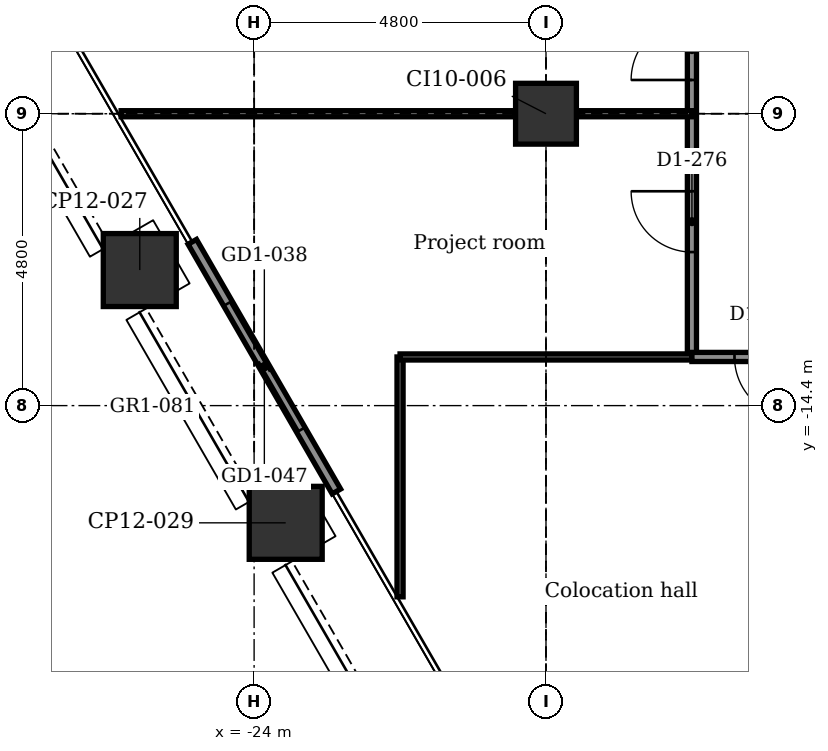
"""IFC4 building model, lengths in metres.
Left out: names, types, materials, properties, quantities, classifications, styles, units other than length and angle.
Written with IfcOpenShell. Run it as: python <this file> out.ifc"""

import sys

from ifc_helpers import new_model, si_unit, direction, frame, frame_2d, origin, origin_2d, place, context, subcontext, project, spatial, rectangle, extrude, element, fill, save


model = new_model("IFC4")
c1 = context("Model", 3, precision=1e-05, world=origin(), true_north=direction((0.0, 1.0)))
c2 = subcontext(c1, "Body", "Model", "MODEL_VIEW")
j1 = project(units=[si_unit("LENGTHUNIT", "METRE"), si_unit("PLANEANGLEUNIT", "RADIAN")], contexts=[c1])
p1 = place(None, origin())
s1 = spatial("IfcSite", under=j1, at=p1, CompositionType="ELEMENT")
p2 = place(p1, origin())
s2 = spatial("IfcBuilding", under=s1, at=p2, CompositionType="ELEMENT")
p3 = place(p2, frame((0.0, 0.0, 95.9)))
s3 = spatial("IfcBuildingStorey", under=s2, at=p3, CompositionType="ELEMENT", Elevation=95.9)
for number, where, z_axis, x_axis in (
    (1, (-23.48, -16.328, -0.2), (0.0, 0.0, 1.0), (0.866, 0.5, 0.0)),
    (2, (-25.88, -12.171, -0.2), (0.0, 0.0, 1.0), (0.866, 0.5, 0.0)),
):
    element("IfcColumn", number, at=place(p3, frame(where, z_axis=z_axis, x_axis=x_axis)), inside=s3, PredefinedType="COLUMN", context=c2, shape_type="SweptSolid", body=[
        extrude(rectangle(XDim=1.2, YDim=1.2, at=origin_2d()), origin(), (0.0, 0.0, 1.0), 4.5),
    ])
p4 = place(p3, frame((-19.2, -9.6, -0.2), z_axis=(0.0, 0.0, 1.0), x_axis=(1.0, 0.0, 0.0)))
e3 = element("IfcColumn", 3, at=p4, inside=s3, PredefinedType="COLUMN", context=c2, shape_type="SweptSolid", body=[
    extrude(rectangle(XDim=1.0, YDim=1.0, at=origin_2d()), origin(), (0.0, 0.0, 1.0), 4.5),
])
p5 = place(p3, frame((-22.647, -15.812, 0.0), z_axis=(0.0, 0.0, 1.0), x_axis=(-0.499978080042, 0.866038058908, 0.0)))
e4 = element("IfcWall", 4, at=p5, inside=s3, PredefinedType="PARTITIONING", context=c2, shape_type="SweptSolid", body=[
    extrude(rectangle(XDim=4.74, YDim=0.16, at=frame_2d((2.37, 0.0))), origin(), (0.0, 0.0, 1.0), 4.3),
])
p6 = place(p5, frame((1.17, 0.0, 0.0)))
e5 = element("IfcOpeningElement", 5, at=p6, cuts=e4, PredefinedType="OPENING", context=c2, shape_type="SweptSolid", body=[
    extrude(rectangle(XDim=2.4, YDim=2.4, at=frame_2d((1.2, 1.2))), frame((0.0, 0.09, 0.0), z_axis=(0.0, -1.0, 0.0), x_axis=(1.0, 0.0, 0.0)), (0.0, 0.0, 1.0), 0.18),
])
p7 = place(p3, frame((-16.8, -13.6, 0.0), z_axis=(0.0, 0.0, 1.0), x_axis=(0.0, 1.0, 0.0)))
e6 = element("IfcWall", 6, at=p7, inside=s3, PredefinedType="PARTITIONING", context=c2, shape_type="SweptSolid", body=[
    extrude(rectangle(XDim=9.65, YDim=0.15, at=frame_2d((4.825, 0.0))), origin(), (0.0, 0.0, 1.0), 4.3),
])
p8 = place(p7, frame((1.725, 0.0, 0.0)))
e7 = element("IfcOpeningElement", 7, at=p8, cuts=e6, PredefinedType="OPENING", context=c2, shape_type="SweptSolid", body=[
    extrude(rectangle(XDim=1.0, YDim=2.1, at=frame_2d((0.5, 1.05))), frame((0.0, 0.085, 0.0), z_axis=(0.0, -1.0, 0.0), x_axis=(1.0, 0.0, 0.0)), (0.0, 0.0, 1.0), 0.17),
])
p9 = place(p7, frame((4.555, 0.0, 0.0)))
e8 = element("IfcOpeningElement", 8, at=p9, cuts=e6, PredefinedType="OPENING", context=c2, shape_type="SweptSolid", body=[
    extrude(rectangle(XDim=1.0, YDim=2.1, at=frame_2d((0.5, 1.05))), frame((0.0, 0.085, 0.0), z_axis=(0.0, -1.0, 0.0), x_axis=(1.0, 0.0, 0.0)), (0.0, 0.0, 1.0), 0.17),
])
p10 = place(p7, frame((7.7, 0.0, 0.0)))
e9 = element("IfcOpeningElement", 9, at=p10, cuts=e6, PredefinedType="OPENING", context=c2, shape_type="SweptSolid", body=[
    extrude(rectangle(XDim=1.0, YDim=2.1, at=frame_2d((0.5, 1.05))), frame((0.0, 0.085, 0.0), z_axis=(0.0, -1.0, 0.0), x_axis=(1.0, 0.0, 0.0)), (0.0, 0.0, 1.0), 0.17),
])
p11 = place(p3, frame((-21.6, -17.545, 0.0), z_axis=(0.0, 0.0, 1.0), x_axis=(0.0, 1.0, 0.0)))
e10 = element("IfcWall", 10, at=p11, inside=s3, PredefinedType="PARTITIONING", context=c2, shape_type="SweptSolid", body=[
    extrude(rectangle(XDim=3.945, YDim=0.1, at=frame_2d((1.972, 0.0))), origin(), (0.0, 0.0, 1.0), 4.3),
])
p12 = place(p3, frame((-21.6, -13.6, 0.0), z_axis=(0.0, 0.0, 1.0), x_axis=(1.0, 0.0, 0.0)))
e11 = element("IfcWall", 11, at=p12, inside=s3, PredefinedType="PARTITIONING", context=c2, shape_type="SweptSolid", body=[
    extrude(rectangle(XDim=4.8, YDim=0.1, at=frame_2d((2.4, 0.0))), origin(), (0.0, 0.0, 1.0), 4.3),
])
p13 = place(p3, frame((-16.8, -13.6, 0.0), z_axis=(0.0, 0.0, 1.0), x_axis=(1.0, 0.0, 0.0)))
e12 = element("IfcWall", 12, at=p13, inside=s3, PredefinedType="PARTITIONING", context=c2, shape_type="SweptSolid", body=[
    extrude(rectangle(XDim=38.4, YDim=0.15, at=frame_2d((19.2, 0.0))), origin(), (0.0, 0.0, 1.0), 4.3),
])
p14 = place(p13, frame((0.7, 0.0, 0.0)))
e13 = element("IfcOpeningElement", 13, at=p14, cuts=e12, PredefinedType="OPENING", context=c2, shape_type="SweptSolid", body=[
    extrude(rectangle(XDim=1.0, YDim=2.1, at=frame_2d((0.5, 1.05))), frame((0.0, 0.085, 0.0), z_axis=(0.0, -1.0, 0.0), x_axis=(1.0, 0.0, 0.0)), (0.0, 0.0, 1.0), 0.17),
])
p15 = place(p13, frame((5.025, 0.0, 0.0)))
e14 = element("IfcOpeningElement", 14, at=p15, cuts=e12, PredefinedType="OPENING", context=c2, shape_type="SweptSolid", body=[
    extrude(rectangle(XDim=1.0, YDim=2.1, at=frame_2d((0.5, 1.05))), frame((0.0, 0.085, 0.0), z_axis=(0.0, -1.0, 0.0), x_axis=(1.0, 0.0, 0.0)), (0.0, 0.0, 1.0), 0.17),
])
p16 = place(p13, frame((9.1, 0.0, 0.0)))
e15 = element("IfcOpeningElement", 15, at=p16, cuts=e12, PredefinedType="OPENING", context=c2, shape_type="SweptSolid", body=[
    extrude(rectangle(XDim=1.0, YDim=2.1, at=frame_2d((0.5, 1.05))), frame((0.0, 0.085, 0.0), z_axis=(0.0, -1.0, 0.0), x_axis=(1.0, 0.0, 0.0)), (0.0, 0.0, 1.0), 0.17),
])
p17 = place(p13, frame((12.7, 0.0, 0.0)))
e16 = element("IfcOpeningElement", 16, at=p17, cuts=e12, PredefinedType="OPENING", context=c2, shape_type="SweptSolid", body=[
    extrude(rectangle(XDim=1.0, YDim=2.1, at=frame_2d((0.5, 1.05))), frame((0.0, 0.085, 0.0), z_axis=(0.0, -1.0, 0.0), x_axis=(1.0, 0.0, 0.0)), (0.0, 0.0, 1.0), 0.17),
])
p18 = place(p13, frame((15.1, 0.0, 0.0)))
e17 = element("IfcOpeningElement", 17, at=p18, cuts=e12, PredefinedType="OPENING", context=c2, shape_type="SweptSolid", body=[
    extrude(rectangle(XDim=1.0, YDim=2.1, at=frame_2d((0.5, 1.05))), frame((0.0, 0.085, 0.0), z_axis=(0.0, -1.0, 0.0), x_axis=(1.0, 0.0, 0.0)), (0.0, 0.0, 1.0), 0.17),
])
p19 = place(p13, frame((24.015, 0.0, 0.0)))
e18 = element("IfcOpeningElement", 18, at=p19, cuts=e12, PredefinedType="OPENING", context=c2, shape_type="SweptSolid", body=[
    extrude(rectangle(XDim=1.0, YDim=2.1, at=frame_2d((0.5, 1.05))), frame((0.0, 0.085, 0.0), z_axis=(0.0, -1.0, 0.0), x_axis=(1.0, 0.0, 0.0)), (0.0, 0.0, 1.0), 0.17),
])
p20 = place(p13, frame((29.5, 0.0, 0.0)))
e19 = element("IfcOpeningElement", 19, at=p20, cuts=e12, PredefinedType="OPENING", context=c2, shape_type="SweptSolid", body=[
    extrude(rectangle(XDim=1.0, YDim=2.1, at=frame_2d((0.5, 1.05))), frame((0.0, 0.085, 0.0), z_axis=(0.0, -1.0, 0.0), x_axis=(1.0, 0.0, 0.0)), (0.0, 0.0, 1.0), 0.17),
])
p21 = place(p13, frame((18.75, 0.0, 0.0)))
e20 = element("IfcOpeningElement", 20, at=p21, cuts=e12, PredefinedType="OPENING", context=c2, shape_type="SweptSolid", body=[
    extrude(rectangle(XDim=0.9, YDim=2.1, at=frame_2d((0.45, 1.05))), frame((0.0, 0.085, 0.0), z_axis=(0.0, -1.0, 0.0), x_axis=(1.0, 0.0, 0.0)), (0.0, 0.0, 1.0), 0.17),
])
p22 = place(p13, frame((21.75, 0.0, 0.0)))
e21 = element("IfcOpeningElement", 21, at=p22, cuts=e12, PredefinedType="OPENING", context=c2, shape_type="SweptSolid", body=[
    extrude(rectangle(XDim=0.9, YDim=2.1, at=frame_2d((0.45, 1.05))), frame((0.0, 0.085, 0.0), z_axis=(0.0, -1.0, 0.0), x_axis=(1.0, 0.0, 0.0)), (0.0, 0.0, 1.0), 0.17),
])
p23 = place(p3, frame((-26.187, -9.6, 0.0), z_axis=(0.0, 0.0, 1.0), x_axis=(1.0, 0.0, 0.0)))
e22 = element("IfcWall", 22, at=p23, inside=s3, PredefinedType="PARTITIONING", context=c2, shape_type="SweptSolid", body=[
    extrude(rectangle(XDim=6.487, YDim=0.1, at=frame_2d((3.243, 0.0))), origin(), (0.0, 0.0, 1.0), 3.692),
])
p24 = place(p3, frame((-18.7, -9.6, 0.0), z_axis=(0.0, 0.0, 1.0), x_axis=(1.0, 0.0, 0.0)))
e23 = element("IfcWall", 23, at=p24, inside=s3, PredefinedType="PARTITIONING", context=c2, shape_type="SweptSolid", body=[
    extrude(rectangle(XDim=1.9, YDim=0.1, at=frame_2d((0.95, 0.0))), origin(), (0.0, 0.0, 1.0), 3.692),
])
p25 = place(p6, origin())
e24 = element("IfcDoor", 24, at=p25, inside=s3, OperationType="DOUBLE_DOOR_SLIDING", PredefinedType="DOOR", context=c2, shape_type="SweptSolid", body=[
    extrude(rectangle(XDim=2.4, YDim=2.4, at=frame_2d((1.2, 1.2))), frame((0.0, 0.025, 0.0), z_axis=(0.0, -1.0, 0.0), x_axis=(1.0, 0.0, 0.0)), (0.0, 0.0, 1.0), 0.05),
])
fill(e5, e24)
p26 = place(p14, frame((1.0, 0.0, 0.0), z_axis=(0.0, 0.0, 1.0), x_axis=(-1.0, 0.0, 0.0)))
e25 = element("IfcDoor", 25, at=p26, inside=s3, OperationType="SINGLE_SWING_RIGHT", PredefinedType="DOOR", context=c2, shape_type="SweptSolid", body=[
    extrude(rectangle(XDim=1.0, YDim=2.1, at=frame_2d((0.5, 1.05))), frame((0.0, 0.025, 0.0), z_axis=(0.0, -1.0, 0.0), x_axis=(1.0, 0.0, 0.0)), (0.0, 0.0, 1.0), 0.05),
])
fill(e13, e25)
p27 = place(p8, origin())
e26 = element("IfcDoor", 26, at=p27, inside=s3, OperationType="SINGLE_SWING_RIGHT", PredefinedType="DOOR", context=c2, shape_type="SweptSolid", body=[
    extrude(rectangle(XDim=1.0, YDim=2.1, at=frame_2d((0.5, 1.05))), frame((0.0, 0.025, 0.0), z_axis=(0.0, -1.0, 0.0), x_axis=(1.0, 0.0, 0.0)), (0.0, 0.0, 1.0), 0.05),
])
fill(e7, e26)
p28 = place(p9, origin())
e27 = element("IfcDoor", 27, at=p28, inside=s3, OperationType="SINGLE_SWING_LEFT", PredefinedType="DOOR", context=c2, shape_type="SweptSolid", body=[
    extrude(rectangle(XDim=1.0, YDim=2.1, at=frame_2d((0.5, 1.05))), frame((0.0, 0.025, 0.0), z_axis=(0.0, -1.0, 0.0), x_axis=(1.0, 0.0, 0.0)), (0.0, 0.0, 1.0), 0.05),
])
fill(e8, e27)
save(model, sys.argv[1])
